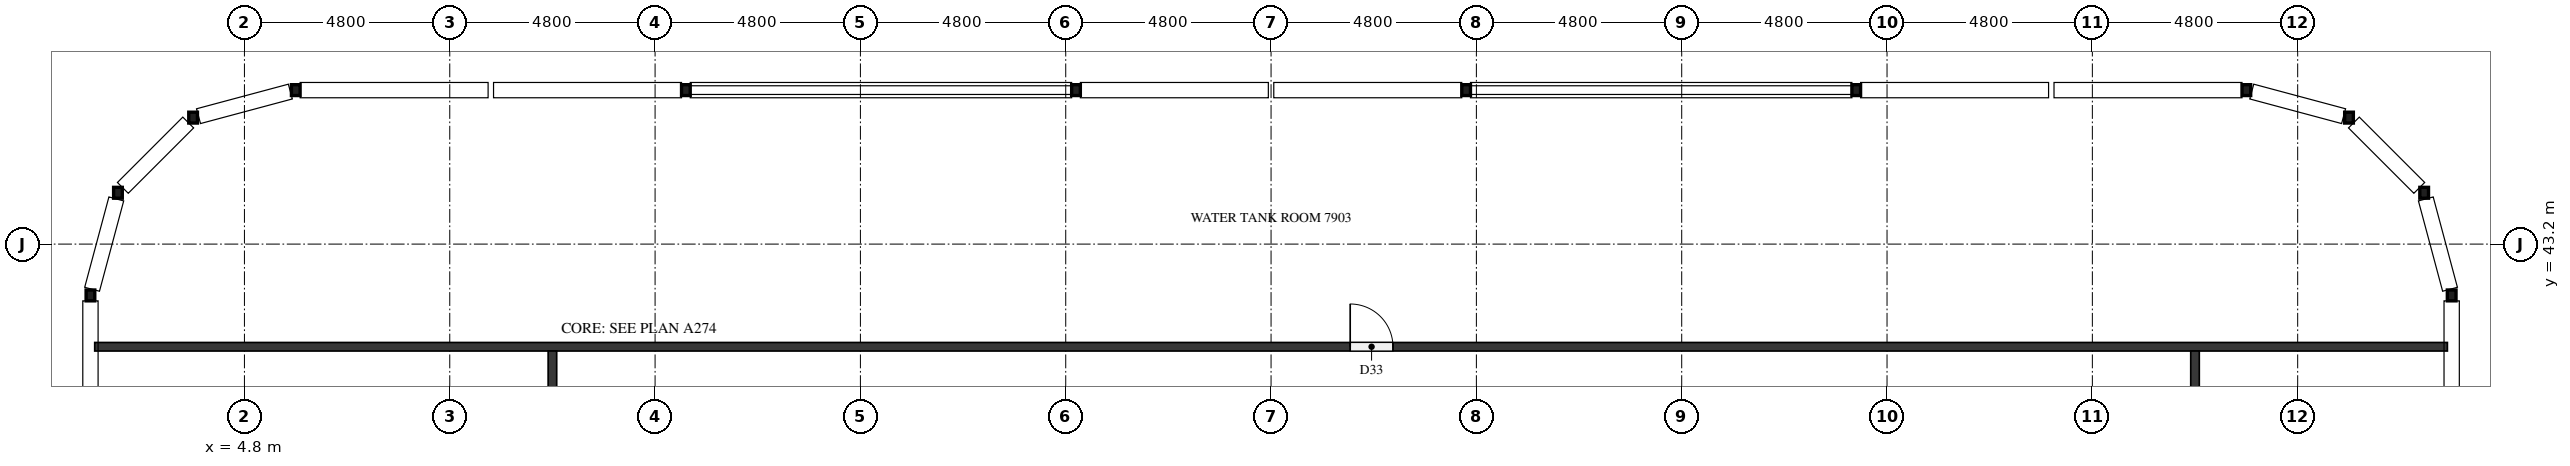
"""IFC4 building model, lengths in metres.
Left out: names, types, materials, properties, quantities, classifications, styles, units other than length and angle.
Written with IfcOpenShell. Run it as: python <this file> out.ifc"""

import sys

from ifc_helpers import new_model, si_unit, direction, frame, frame_2d, origin, origin_2d, place, context, subcontext, project, spatial, rectangle, hollow_rectangle, extrude, element, fill, save


model = new_model("IFC4")
c1 = context("Model", 3, precision=1e-05, world=origin(), true_north=direction((0.0, 1.0)))
c2 = subcontext(c1, "Body", "Model", "MODEL_VIEW")
j1 = project(units=[si_unit("LENGTHUNIT", "METRE"), si_unit("PLANEANGLEUNIT", "RADIAN")], contexts=[c1])
p1 = place(None, origin())
s1 = spatial("IfcSite", under=j1, at=p1, CompositionType="ELEMENT")
p2 = place(p1, origin())
s2 = spatial("IfcBuilding", under=s1, at=p2, CompositionType="ELEMENT")
p3 = place(p2, frame((0.0, 0.0, 305.9)))
s3 = spatial("IfcBuildingStorey", under=s2, at=p3, CompositionType="ELEMENT", Elevation=305.9)
for number, where, z_axis, x_axis in (
    (1, (56.4, 42.0, 0.0), (0.0, 0.0, 1.0), (1.0, 0.0, 0.0)),
    (2, (55.757, 44.4, 0.0), (0.0, 0.0, 1.0), (1.0, 0.0, 0.0)),
    (3, (54.0, 46.157, 0.0), (0.0, 0.0, 1.0), (1.0, 0.0, 0.0)),
    (4, (51.6, 46.8, 0.0), (0.0, 0.0, 1.0), (1.0, 0.0, 0.0)),
    (5, (42.48, 46.8, 0.0), (0.0, 0.0, 1.0), (1.0, 0.0, 0.0)),
    (6, (33.36, 46.8, 0.0), (0.0, 0.0, 1.0), (1.0, 0.0, 0.0)),
    (7, (24.24, 46.8, 0.0), (0.0, 0.0, 1.0), (1.0, 0.0, 0.0)),
    (8, (15.12, 46.8, 0.0), (0.0, 0.0, 1.0), (1.0, 0.0, 0.0)),
    (9, (6.0, 46.8, 0.0), (0.0, 0.0, 1.0), (1.0, 0.0, 0.0)),
    (10, (3.6, 46.157, 0.0), (0.0, 0.0, 1.0), (1.0, 0.0, 0.0)),
    (11, (1.843, 44.4, 0.0), (0.0, 0.0, 1.0), (1.0, 0.0, 0.0)),
    (12, (1.2, 42.0, 0.0), (0.0, 0.0, 1.0), (1.0, 0.0, 0.0)),
):
    element("IfcColumn", number, at=place(p3, frame(where, z_axis=z_axis, x_axis=x_axis)), inside=s3, PredefinedType="COLUMN", context=c2, shape_type="SweptSolid", body=[
        extrude(hollow_rectangle(XDim=0.203, YDim=0.254, WallThickness=0.01, InnerFilletRadius=0.004, OuterFilletRadius=0.013, at=origin_2d()), origin(), (0.0, 0.0, 1.0), 3.8),
    ])
p4 = place(p3, frame((1.3, 40.8, 0.0), z_axis=(0.0, 0.0, 1.0), x_axis=(1.0, 0.0, 0.0)))
e13 = element("IfcWall", 13, at=p4, inside=s3, PredefinedType="PARTITIONING", context=c2, shape_type="SweptSolid", body=[
    extrude(rectangle(XDim=55.0, YDim=0.2, at=frame_2d((27.5, 0.0))), origin(), (0.0, 0.0, 1.0), 3.8),
])
p5 = place(p4, frame((29.35, 0.0, 0.0)))
e14 = element("IfcOpeningElement", 14, at=p5, cuts=e13, PredefinedType="OPENING", context=c2, shape_type="SweptSolid", body=[
    extrude(rectangle(XDim=1.0, YDim=2.1, at=frame_2d((0.5, 1.05))), frame((0.0, 0.11, 0.0), z_axis=(0.0, -1.0, 0.0), x_axis=(1.0, 0.0, 0.0)), (0.0, 0.0, 1.0), 0.22),
])
p6 = place(p3, frame((12.0, 12.1, 0.0), z_axis=(0.0, 0.0, 1.0), x_axis=(0.0, 1.0, 0.0)))
e15 = element("IfcWall", 15, at=p6, inside=s3, PredefinedType="PARTITIONING", context=c2, shape_type="SweptSolid", body=[
    extrude(rectangle(XDim=28.6, YDim=0.2, at=frame_2d((14.3, 0.0))), origin(), (0.0, 0.0, 1.0), 3.8),
])
p7 = place(p6, frame((13.75, 0.0, 0.0)))
e16 = element("IfcOpeningElement", 16, at=p7, cuts=e15, PredefinedType="OPENING", context=c2, shape_type="SweptSolid", body=[
    extrude(rectangle(XDim=1.0, YDim=2.1, at=frame_2d((0.5, 1.05))), frame((0.0, 0.11, 0.0), z_axis=(0.0, -1.0, 0.0), x_axis=(1.0, 0.0, 0.0)), (0.0, 0.0, 1.0), 0.22),
])
p8 = place(p3, frame((50.4, 40.7, 0.0), z_axis=(0.0, 0.0, 1.0), x_axis=(0.0, -1.0, 0.0)))
e17 = element("IfcWall", 17, at=p8, inside=s3, PredefinedType="PARTITIONING", context=c2, shape_type="SweptSolid", body=[
    extrude(rectangle(XDim=28.6, YDim=0.2, at=frame_2d((14.3, 0.0))), origin(), (0.0, 0.0, 1.0), 3.8),
])
p9 = place(p8, frame((13.75, 0.0, 0.0)))
e18 = element("IfcOpeningElement", 18, at=p9, cuts=e17, PredefinedType="OPENING", context=c2, shape_type="SweptSolid", body=[
    extrude(rectangle(XDim=1.0, YDim=2.1, at=frame_2d((0.5, 1.05))), frame((0.0, 0.11, 0.0), z_axis=(0.0, -1.0, 0.0), x_axis=(1.0, 0.0, 0.0)), (0.0, 0.0, 1.0), 0.22),
])
p10 = place(p5, origin())
e19 = element("IfcDoor", 19, at=p10, inside=s3, OperationType="SINGLE_SWING_LEFT", PredefinedType="DOOR", context=c2, shape_type="SweptSolid", body=[
    extrude(rectangle(XDim=1.0, YDim=2.1, at=frame_2d((0.5, 1.05))), frame((0.0, 0.025, 0.0), z_axis=(0.0, -1.0, 0.0), x_axis=(1.0, 0.0, 0.0)), (0.0, 0.0, 1.0), 0.05),
])
fill(e14, e19)
save(model, sys.argv[1])
